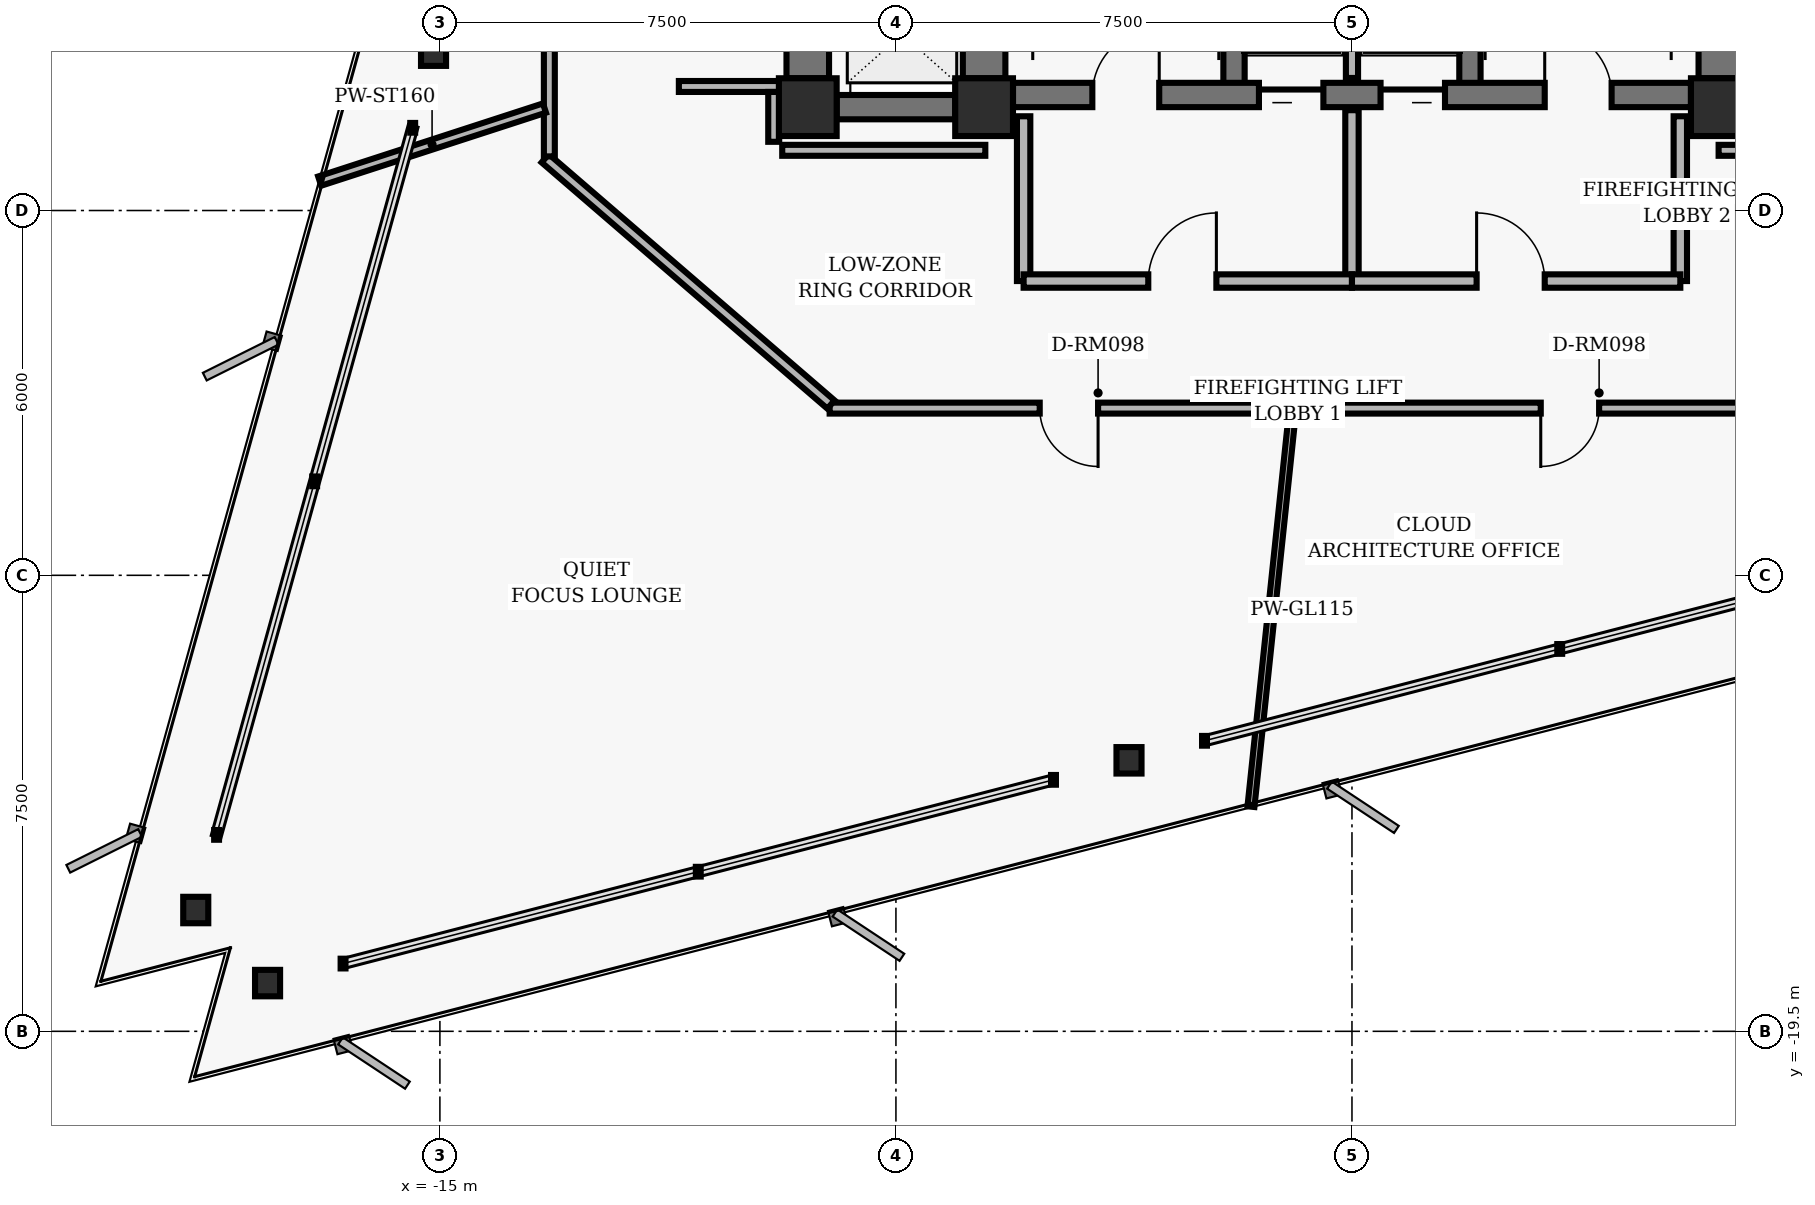
"""IFC4 building model, lengths in metres.
Left out: names, types, materials, properties, quantities, classifications, styles, units other than length and angle.
Written with IfcOpenShell. Run it as: python <this file> out.ifc"""

import sys

from ifc_helpers import new_model, si_unit, direction, frame, frame_2d, origin, origin_2d, place, context, subcontext, project, spatial, rectangle, hollow_rectangle, i_section, extrude, element, fill, save


model = new_model("IFC4")
c1 = context("Model", 3, precision=1e-05, world=origin(), true_north=direction((0.0, 1.0)))
c2 = subcontext(c1, "Body", "Model", "MODEL_VIEW")
j1 = project(units=[si_unit("LENGTHUNIT", "METRE"), si_unit("PLANEANGLEUNIT", "RADIAN")], contexts=[c1])
p1 = place(None, origin())
s1 = spatial("IfcSite", under=j1, at=p1, CompositionType="ELEMENT")
p2 = place(p1, origin())
s2 = spatial("IfcBuilding", under=s1, at=p2, CompositionType="ELEMENT")
p3 = place(p2, frame((0.0, 0.0, 88.64)))
s3 = spatial("IfcBuildingStorey", under=s2, at=p3, CompositionType="ELEMENT", Elevation=88.64)
for number, where, z_axis, x_axis in (
    (1, (-6.05, -4.3, 0.0), (0.0, 0.0, 1.0), (1.0, 0.0, 0.0)),
    (2, (6.05, -4.3, 0.0), (0.0, 0.0, 1.0), (1.0, 0.0, 0.0)),
    (3, (-8.95, -4.3, 0.0), (0.0, 0.0, 1.0), (1.0, 0.0, 0.0)),
):
    element("IfcColumn", number, at=place(p3, frame(where, z_axis=z_axis, x_axis=x_axis)), inside=s3, PredefinedType="COLUMN", context=c2, shape_type="SweptSolid", body=[
        extrude(hollow_rectangle(XDim=0.95, YDim=0.95, WallThickness=0.06, InnerFilletRadius=0.02, OuterFilletRadius=0.04, at=origin_2d()), origin(), (0.0, 0.0, 1.0), 3.04),
    ])
for number, where, z_axis, x_axis in (
    (4, (-6.05, -3.825, 0.0), (0.0, 0.0, 1.0), (0.0, 1.0, 0.0)),
    (5, (6.05, -3.825, 0.0), (0.0, 0.0, 1.0), (0.0, 1.0, 0.0)),
):
    element("IfcWall", number, at=place(p3, frame(where, z_axis=z_axis, x_axis=x_axis)), inside=s3, PredefinedType="SHEAR", context=c2, shape_type="SweptSolid", body=[
        extrude(rectangle(XDim=3.35, YDim=0.7, at=frame_2d((1.675, 0.0))), origin(), (0.0, 0.0, 1.0), 2.788),
    ])
for number, where, z_axis, x_axis in (
    (6, (-1.94, -4.1, 0.0), (0.0, 0.0, 1.0), (0.0, 1.0, 0.0)),
    (7, (1.94, -4.1, 0.0), (0.0, 0.0, 1.0), (0.0, 1.0, 0.0)),
):
    element("IfcWall", number, at=place(p3, frame(where, z_axis=z_axis, x_axis=x_axis)), inside=s3, PredefinedType="SHEAR", context=c2, shape_type="SweptSolid", body=[
        extrude(rectangle(XDim=8.2, YDim=0.35, at=frame_2d((4.1, 0.0))), origin(), (0.0, 0.0, 1.0), 2.788),
    ])
p4 = place(p3, frame((-5.575, -4.1, 0.0), z_axis=(0.0, 0.0, 1.0), x_axis=(1.0, 0.0, 0.0)))
e8 = element("IfcWall", 8, at=p4, inside=s3, PredefinedType="SHEAR", context=c2, shape_type="SweptSolid", body=[
    extrude(rectangle(XDim=11.15, YDim=0.4, at=frame_2d((5.575, 0.0))), origin(), (0.0, 0.0, 1.0), 2.788),
])
p5 = place(p4, frame((1.305, 0.0, 0.0)))
e9 = element("IfcOpeningElement", 9, at=p5, cuts=e8, PredefinedType="OPENING", context=c2, shape_type="SweptSolid", body=[
    extrude(rectangle(XDim=1.1, YDim=2.04, at=frame_2d((0.55, 1.02))), frame((0.0, 0.21, 0.0), z_axis=(0.0, -1.0, 0.0), x_axis=(1.0, 0.0, 0.0)), (0.0, 0.0, 1.0), 0.42),
])
p6 = place(p4, frame((8.745, 0.0, 0.0)))
e10 = element("IfcOpeningElement", 10, at=p6, cuts=e8, PredefinedType="OPENING", context=c2, shape_type="SweptSolid", body=[
    extrude(rectangle(XDim=1.1, YDim=2.04, at=frame_2d((0.55, 1.02))), frame((0.0, 0.21, 0.0), z_axis=(0.0, -1.0, 0.0), x_axis=(1.0, 0.0, 0.0)), (0.0, 0.0, 1.0), 0.42),
])
p7 = place(p4, frame((4.045, 0.0, 0.0)))
e11 = element("IfcOpeningElement", 11, at=p7, cuts=e8, PredefinedType="OPENING", context=c2, shape_type="SweptSolid", body=[
    extrude(rectangle(XDim=1.06, YDim=2.04, at=frame_2d((0.53, 1.02))), frame((0.0, 0.21, 0.0), z_axis=(0.0, -1.0, 0.0), x_axis=(1.0, 0.0, 0.0)), (0.0, 0.0, 1.0), 0.42),
])
p8 = place(p4, frame((6.045, 0.0, 0.0)))
e12 = element("IfcOpeningElement", 12, at=p8, cuts=e8, PredefinedType="OPENING", context=c2, shape_type="SweptSolid", body=[
    extrude(rectangle(XDim=1.06, YDim=2.04, at=frame_2d((0.53, 1.02))), frame((0.0, 0.21, 0.0), z_axis=(0.0, -1.0, 0.0), x_axis=(1.0, 0.0, 0.0)), (0.0, 0.0, 1.0), 0.42),
])
p9 = place(p3, frame((-8.95, -3.825, 0.0), z_axis=(0.0, 0.0, 1.0), x_axis=(0.0, 1.0, 0.0)))
e13 = element("IfcWall", 13, at=p9, inside=s3, PredefinedType="SHEAR", context=c2, shape_type="SweptSolid", body=[
    extrude(rectangle(XDim=7.85, YDim=0.7, at=frame_2d((3.925, 0.0))), origin(), (0.0, 0.0, 1.0), 2.788),
])
p10 = place(p9, frame((0.55, 0.0, 0.0)))
e14 = element("IfcOpeningElement", 14, at=p10, cuts=e13, PredefinedType="OPENING", context=c2, shape_type="SweptSolid", body=[
    extrude(rectangle(XDim=1.06, YDim=2.04, at=frame_2d((0.53, 1.02))), frame((0.0, 0.36, 0.0), z_axis=(0.0, -1.0, 0.0), x_axis=(1.0, 0.0, 0.0)), (0.0, 0.0, 1.0), 0.72),
])
p11 = place(p9, frame((3.395, 0.0, 0.0)))
e15 = element("IfcOpeningElement", 15, at=p11, cuts=e13, PredefinedType="OPENING", context=c2, shape_type="SweptSolid", body=[
    extrude(rectangle(XDim=1.06, YDim=2.04, at=frame_2d((0.53, 1.02))), frame((0.0, 0.36, 0.0), z_axis=(0.0, -1.0, 0.0), x_axis=(1.0, 0.0, 0.0)), (0.0, 0.0, 1.0), 0.72),
])
p12 = place(p9, frame((6.23, 0.0, 0.0)))
e16 = element("IfcOpeningElement", 16, at=p12, cuts=e13, PredefinedType="OPENING", context=c2, shape_type="SweptSolid", body=[
    extrude(rectangle(XDim=1.06, YDim=2.04, at=frame_2d((0.53, 1.02))), frame((0.0, 0.36, 0.0), z_axis=(0.0, -1.0, 0.0), x_axis=(1.0, 0.0, 0.0)), (0.0, 0.0, 1.0), 0.72),
])
p13 = place(p3, frame((-8.475, -4.3, 0.0), z_axis=(0.0, 0.0, 1.0), x_axis=(1.0, 0.0, 0.0)))
e17 = element("IfcWall", 17, at=p13, inside=s3, PredefinedType="SHEAR", context=c2, shape_type="SweptSolid", body=[
    extrude(rectangle(XDim=1.95, YDim=0.4, at=frame_2d((0.975, 0.0))), origin(), (0.0, 0.0, 1.0), 2.788),
])
for number, where, z_axis, x_axis in (
    (18, (-15.104, -3.404, 0.0), (0.0, 0.0, 1.0), (1.0, 0.0, 0.0)),
    (19, (-19.015, -17.505, 0.0), (0.0, 0.0, 1.0), (1.0, 0.0, 0.0)),
    (20, (-17.834, -18.707, 0.0), (0.0, 0.0, 1.0), (1.0, 0.0, 0.0)),
    (21, (-3.667, -15.043, 0.0), (0.0, 0.0, 1.0), (1.0, 0.0, 0.0)),
):
    element("IfcColumn", number, at=place(p3, frame(where, z_axis=z_axis, x_axis=x_axis)), inside=s3, PredefinedType="COLUMN", context=c2, shape_type="SweptSolid", body=[
        extrude(i_section(OverallWidth=0.412, OverallDepth=0.435, WebThickness=0.036, FlangeThickness=0.057, FilletRadius=0.022, at=origin_2d()), origin(), (0.0, 0.0, 1.0), 3.04),
    ])
p14 = place(p3, frame((0.0, -3.82, 0.0), z_axis=(0.0, 0.0, 1.0), x_axis=(0.0, 1.0, 0.0)))
e22 = element("IfcWall", 22, at=p14, inside=s3, PredefinedType="PARTITIONING", context=c2, shape_type="SweptSolid", body=[
    extrude(rectangle(XDim=2.67, YDim=0.2, at=frame_2d((1.335, 0.0))), origin(), (0.0, 0.0, 1.0), 2.763),
])
for number, where, z_axis, x_axis in (
    (23, (-5.4, -7.16, 0.0), (0.0, 0.0, 1.0), (0.0, 1.0, 0.0)),
    (24, (5.4, -7.16, 0.0), (0.0, 0.0, 1.0), (0.0, 1.0, 0.0)),
):
    element("IfcWall", number, at=place(p3, frame(where, z_axis=z_axis, x_axis=x_axis)), inside=s3, PredefinedType="PARTITIONING", context=c2, shape_type="SweptSolid", body=[
        extrude(rectangle(XDim=2.71, YDim=0.22, at=frame_2d((1.355, 0.0))), origin(), (0.0, 0.0, 1.0), 2.763),
    ])
p15 = place(p3, frame((0.0, -7.16, 0.0), z_axis=(0.0, 0.0, 1.0), x_axis=(0.0, 1.0, 0.0)))
e25 = element("IfcWall", 25, at=p15, inside=s3, PredefinedType="PARTITIONING", context=c2, shape_type="SweptSolid", body=[
    extrude(rectangle(XDim=2.81, YDim=0.22, at=frame_2d((1.405, 0.0))), origin(), (0.0, 0.0, 1.0), 2.763),
])
p16 = place(p3, frame((-5.4, -7.16, 0.0), z_axis=(0.0, 0.0, 1.0), x_axis=(1.0, 0.0, 0.0)))
e26 = element("IfcWall", 26, at=p16, inside=s3, PredefinedType="PARTITIONING", context=c2, shape_type="SweptSolid", body=[
    extrude(rectangle(XDim=5.4, YDim=0.22, at=frame_2d((2.7, 0.0))), origin(), (0.0, 0.0, 1.0), 2.763),
])
p17 = place(p16, frame((2.05, 0.0, 0.0)))
e27 = element("IfcOpeningElement", 27, at=p17, cuts=e26, PredefinedType="OPENING", context=c2, shape_type="SweptSolid", body=[
    extrude(rectangle(XDim=1.12, YDim=2.02, at=frame_2d((0.56, 1.01))), frame((0.0, 0.12, 0.0), z_axis=(0.0, -1.0, 0.0), x_axis=(1.0, 0.0, 0.0)), (0.0, 0.0, 1.0), 0.24),
])
p18 = place(p3, frame((0.0, -7.16, 0.0), z_axis=(0.0, 0.0, 1.0), x_axis=(1.0, 0.0, 0.0)))
e28 = element("IfcWall", 28, at=p18, inside=s3, PredefinedType="PARTITIONING", context=c2, shape_type="SweptSolid", body=[
    extrude(rectangle(XDim=5.4, YDim=0.22, at=frame_2d((2.7, 0.0))), origin(), (0.0, 0.0, 1.0), 2.763),
])
p19 = place(p18, frame((2.05, 0.0, 0.0)))
e29 = element("IfcOpeningElement", 29, at=p19, cuts=e28, PredefinedType="OPENING", context=c2, shape_type="SweptSolid", body=[
    extrude(rectangle(XDim=1.12, YDim=2.02, at=frame_2d((0.56, 1.01))), frame((0.0, 0.12, 0.0), z_axis=(0.0, -1.0, 0.0), x_axis=(1.0, 0.0, 0.0)), (0.0, 0.0, 1.0), 0.24),
])
p20 = place(p3, frame((8.41, -9.25, 0.0), z_axis=(0.0, 0.0, 1.0), x_axis=(-1.0, 0.0, 0.0)))
e30 = element("IfcWall", 30, at=p20, inside=s3, PredefinedType="PARTITIONING", context=c2, shape_type="SweptSolid", body=[
    extrude(rectangle(XDim=17.0, YDim=0.18, at=frame_2d((8.5, 0.0))), origin(), (0.0, 0.0, 1.0), 2.277),
])
p21 = place(p20, frame((12.585, 0.0, 0.0)))
e31 = element("IfcOpeningElement", 31, at=p21, cuts=e30, PredefinedType="OPENING", context=c2, shape_type="SweptSolid", body=[
    extrude(rectangle(XDim=0.96, YDim=2.02, at=frame_2d((0.48, 1.01))), frame((0.0, 0.1, 0.0), z_axis=(0.0, -1.0, 0.0), x_axis=(1.0, 0.0, 0.0)), (0.0, 0.0, 1.0), 0.2),
])
p22 = place(p20, frame((4.345, 0.0, 0.0)))
e32 = element("IfcOpeningElement", 32, at=p22, cuts=e30, PredefinedType="OPENING", context=c2, shape_type="SweptSolid", body=[
    extrude(rectangle(XDim=0.96, YDim=2.02, at=frame_2d((0.48, 1.01))), frame((0.0, 0.1, 0.0), z_axis=(0.0, -1.0, 0.0), x_axis=(1.0, 0.0, 0.0)), (0.0, 0.0, 1.0), 0.2),
])
p23 = place(p3, frame((-8.568, -9.191, 0.0), z_axis=(0.0, 0.0, 1.0), x_axis=(-0.757556899173, 0.652769135694, 0.0)))
e33 = element("IfcWall", 33, at=p23, inside=s3, PredefinedType="PARTITIONING", context=c2, shape_type="SweptSolid", body=[
    extrude(rectangle(XDim=6.204, YDim=0.18, at=frame_2d((3.102, 0.0))), origin(), (0.0, 0.0, 1.0), 2.763),
])
p24 = place(p3, frame((-13.2, -5.11, 0.0), z_axis=(0.0, 0.0, 1.0), x_axis=(0.0, 1.0, 0.0)))
e34 = element("IfcWall", 34, at=p24, inside=s3, PredefinedType="PARTITIONING", context=c2, shape_type="SweptSolid", body=[
    extrude(rectangle(XDim=10.22, YDim=0.18, at=frame_2d((5.11, 0.0))), origin(), (0.0, 0.0, 1.0), 2.143),
])
p25 = place(p24, frame((4.899, 0.0, 0.0)))
e35 = element("IfcOpeningElement", 35, at=p25, cuts=e34, PredefinedType="OPENING", context=c2, shape_type="SweptSolid", body=[
    extrude(rectangle(XDim=0.96, YDim=2.02, at=frame_2d((0.48, 1.01))), frame((0.0, 0.1, 0.0), z_axis=(0.0, -1.0, 0.0), x_axis=(1.0, 0.0, 0.0)), (0.0, 0.0, 1.0), 0.2),
])
p26 = place(p3, frame((-11.07, -3.96, 0.0), z_axis=(0.0, 0.0, 1.0), x_axis=(1.0, 0.0, 0.0)))
e36 = element("IfcWall", 36, at=p26, inside=s3, PredefinedType="PARTITIONING", context=c2, shape_type="SweptSolid", body=[
    extrude(rectangle(XDim=1.65, YDim=0.18, at=frame_2d((0.825, 0.0))), origin(), (0.0, 0.0, 1.0), 2.048),
])
p27 = place(p3, frame((-9.51, -4.05, 0.0), z_axis=(0.0, 0.0, 1.0), x_axis=(0.0, -1.0, 0.0)))
e37 = element("IfcWall", 37, at=p27, inside=s3, PredefinedType="PARTITIONING", context=c2, shape_type="SweptSolid", body=[
    extrude(rectangle(XDim=0.82, YDim=0.18, at=frame_2d((0.41, 0.0))), origin(), (0.0, 0.0, 1.0), 2.763),
])
for number, where, z_axis, x_axis in (
    (38, (-9.37, -5.01, 0.0), (0.0, 0.0, 1.0), (1.0, 0.0, 0.0)),
    (39, (6.03, -5.01, 0.0), (0.0, 0.0, 1.0), (1.0, 0.0, 0.0)),
):
    element("IfcWall", number, at=place(p3, frame(where, z_axis=z_axis, x_axis=x_axis)), inside=s3, PredefinedType="PARTITIONING", context=c2, shape_type="SweptSolid", body=[
        extrude(rectangle(XDim=3.34, YDim=0.18, at=frame_2d((1.67, 0.0))), origin(), (0.0, 0.0, 1.0), 2.763),
    ])
p28 = place(p3, frame((-13.28, -4.315, 0.0), z_axis=(0.0, 0.0, 1.0), x_axis=(-0.951067292341, -0.308983827147, 0.0)))
e40 = element("IfcWall", 40, at=p28, inside=s3, PredefinedType="PARTITIONING", context=c2, shape_type="SweptSolid", body=[
    extrude(rectangle(XDim=3.887, YDim=0.16, at=frame_2d((1.944, 0.0))), origin(), (0.0, 0.0, 1.0), 2.763),
])
p29 = place(p3, frame((-0.981, -9.33, 0.0), z_axis=(0.0, 0.0, 1.0), x_axis=(-0.10451105245, -0.994523725165, 0.0)))
e41 = element("IfcWall", 41, at=p29, inside=s3, PredefinedType="MOVABLE", context=c2, shape_type="SweptSolid", body=[
    extrude(rectangle(XDim=6.51, YDim=0.115, at=frame_2d((3.255, 0.0))), origin(), (0.0, 0.0, 1.0), 2.763),
])
p30 = place(p5, origin())
e42 = element("IfcDoor", 42, at=p30, inside=s3, OperationType="SINGLE_SWING_RIGHT", PredefinedType="DOOR", context=c2, shape_type="SweptSolid", body=[
    extrude(rectangle(XDim=1.1, YDim=2.04, at=frame_2d((0.55, 1.02))), frame((0.0, 0.025, 0.0), z_axis=(0.0, -1.0, 0.0), x_axis=(1.0, 0.0, 0.0)), (0.0, 0.0, 1.0), 0.05),
])
fill(e9, e42)
p31 = place(p6, origin())
e43 = element("IfcDoor", 43, at=p31, inside=s3, OperationType="SINGLE_SWING_LEFT", PredefinedType="DOOR", context=c2, shape_type="SweptSolid", body=[
    extrude(rectangle(XDim=1.1, YDim=2.04, at=frame_2d((0.55, 1.02))), frame((0.0, 0.025, 0.0), z_axis=(0.0, -1.0, 0.0), x_axis=(1.0, 0.0, 0.0)), (0.0, 0.0, 1.0), 0.05),
])
fill(e10, e43)
p32 = place(p7, origin())
e44 = element("IfcDoor", 44, at=p32, inside=s3, OperationType="SLIDING_TO_LEFT", PredefinedType="DOOR", context=c2, shape_type="SweptSolid", body=[
    extrude(rectangle(XDim=1.06, YDim=2.04, at=frame_2d((0.53, 1.02))), frame((0.0, 0.025, 0.0), z_axis=(0.0, -1.0, 0.0), x_axis=(1.0, 0.0, 0.0)), (0.0, 0.0, 1.0), 0.05),
])
fill(e11, e44)
p33 = place(p8, origin())
e45 = element("IfcDoor", 45, at=p33, inside=s3, OperationType="SLIDING_TO_RIGHT", PredefinedType="DOOR", context=c2, shape_type="SweptSolid", body=[
    extrude(rectangle(XDim=1.06, YDim=2.04, at=frame_2d((0.53, 1.02))), frame((0.0, 0.025, 0.0), z_axis=(0.0, -1.0, 0.0), x_axis=(1.0, 0.0, 0.0)), (0.0, 0.0, 1.0), 0.05),
])
fill(e12, e45)
p34 = place(p17, origin())
e46 = element("IfcDoor", 46, at=p34, inside=s3, OperationType="SINGLE_SWING_RIGHT", PredefinedType="DOOR", context=c2, shape_type="SweptSolid", body=[
    extrude(rectangle(XDim=1.12, YDim=2.02, at=frame_2d((0.56, 1.01))), frame((0.0, 0.025, 0.0), z_axis=(0.0, -1.0, 0.0), x_axis=(1.0, 0.0, 0.0)), (0.0, 0.0, 1.0), 0.05),
])
fill(e27, e46)
p35 = place(p19, origin())
e47 = element("IfcDoor", 47, at=p35, inside=s3, OperationType="SINGLE_SWING_LEFT", PredefinedType="DOOR", context=c2, shape_type="SweptSolid", body=[
    extrude(rectangle(XDim=1.12, YDim=2.02, at=frame_2d((0.56, 1.01))), frame((0.0, 0.025, 0.0), z_axis=(0.0, -1.0, 0.0), x_axis=(1.0, 0.0, 0.0)), (0.0, 0.0, 1.0), 0.05),
])
fill(e29, e47)
p36 = place(p21, origin())
e48 = element("IfcDoor", 48, at=p36, inside=s3, OperationType="SINGLE_SWING_LEFT", PredefinedType="DOOR", context=c2, shape_type="SweptSolid", body=[
    extrude(rectangle(XDim=0.96, YDim=2.02, at=frame_2d((0.48, 1.01))), frame((0.0, 0.025, 0.0), z_axis=(0.0, -1.0, 0.0), x_axis=(1.0, 0.0, 0.0)), (0.0, 0.0, 1.0), 0.05),
])
fill(e31, e48)
p37 = place(p22, origin())
e49 = element("IfcDoor", 49, at=p37, inside=s3, OperationType="SINGLE_SWING_RIGHT", PredefinedType="DOOR", context=c2, shape_type="SweptSolid", body=[
    extrude(rectangle(XDim=0.96, YDim=2.02, at=frame_2d((0.48, 1.01))), frame((0.0, 0.025, 0.0), z_axis=(0.0, -1.0, 0.0), x_axis=(1.0, 0.0, 0.0)), (0.0, 0.0, 1.0), 0.05),
])
fill(e32, e49)
save(model, sys.argv[1])
